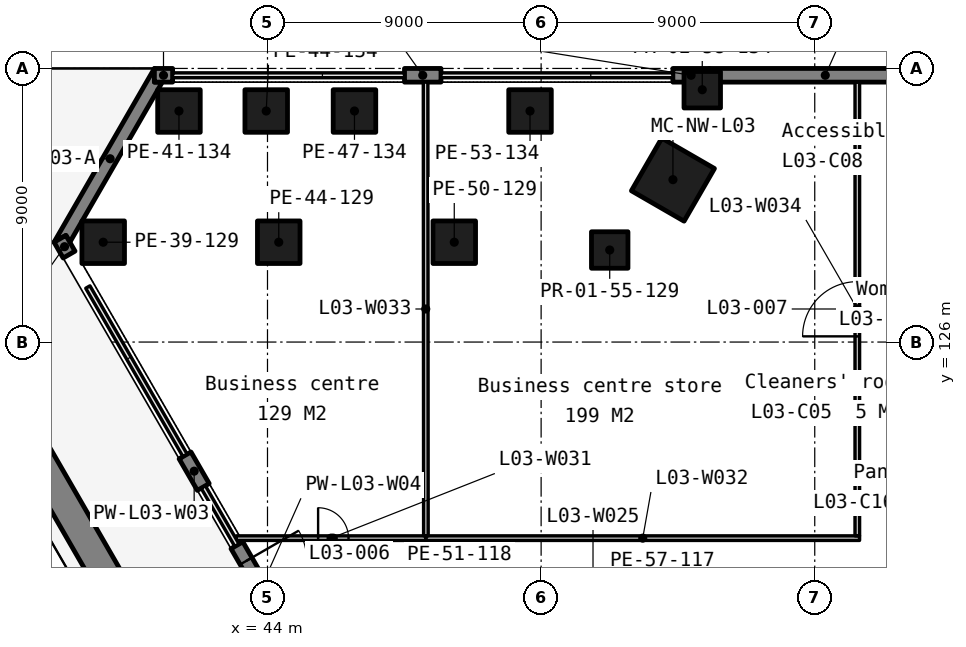
"""IFC4 building model, lengths in metres.
Left out: names, types, materials, properties, quantities, classifications, styles, units other than length and angle.
Written with IfcOpenShell. Run it as: python <this file> out.ifc"""

import sys

from ifc_helpers import new_model, si_unit, direction, frame, frame_2d, origin, origin_2d, place, context, subcontext, project, spatial, polyline, rectangle, outline, extrude, element, fill, save


model = new_model("IFC4")
c1 = context("Model", 3, precision=1e-05, world=origin(), true_north=direction((0.0, 1.0)))
c2 = subcontext(c1, "Body", "Model", "MODEL_VIEW")
j1 = project(units=[si_unit("LENGTHUNIT", "METRE"), si_unit("PLANEANGLEUNIT", "RADIAN")], contexts=[c1])
p1 = place(None, origin())
s1 = spatial("IfcSite", under=j1, at=p1, CompositionType="ELEMENT")
p2 = place(p1, origin())
s2 = spatial("IfcBuilding", under=s1, at=p2, CompositionType="ELEMENT")
p3 = place(p2, frame((0.0, 0.0, 19.5)))
s3 = spatial("IfcBuildingStorey", under=s2, at=p3, CompositionType="ELEMENT", Elevation=19.5)
for number, where, z_axis, x_axis in (
    (1, (38.596, 129.284, 0.0), (0.0, 0.0, 1.0), (1.0, 0.0, 0.0)),
    (2, (41.088, 133.6, 0.0), (0.0, 0.0, 1.0), (1.0, 0.0, 0.0)),
    (3, (44.37, 129.284, 0.0), (0.0, 0.0, 1.0), (1.0, 0.0, 0.0)),
    (4, (43.958, 133.6, 0.0), (0.0, 0.0, 1.0), (1.0, 0.0, 0.0)),
    (5, (46.861, 133.6, 0.0), (0.0, 0.0, 1.0), (1.0, 0.0, 0.0)),
    (6, (50.143, 129.284, 0.0), (0.0, 0.0, 1.0), (1.0, 0.0, 0.0)),
    (7, (52.635, 133.6, 0.0), (0.0, 0.0, 1.0), (1.0, 0.0, 0.0)),
):
    element("IfcColumn", number, at=place(p3, frame(where, z_axis=z_axis, x_axis=x_axis)), inside=s3, PredefinedType="COLUMN", context=c2, shape_type="SweptSolid", body=[
        extrude(rectangle(XDim=1.4, YDim=1.4, at=origin_2d()), origin(), (0.0, 0.0, 1.0), 5.5),
    ])
for number, where, z_axis, x_axis in (
    (8, (55.256, 129.028, 0.0), (0.0, 0.0, 1.0), (1.0, 0.0, 0.0)),
    (9, (58.3, 134.3, 0.0), (0.0, 0.0, 1.0), (1.0, 0.0, 0.0)),
):
    element("IfcColumn", number, at=place(p3, frame(where, z_axis=z_axis, x_axis=x_axis)), inside=s3, PredefinedType="COLUMN", context=c2, shape_type="SweptSolid", body=[
        extrude(rectangle(XDim=1.2, YDim=1.2, at=origin_2d()), origin(), (0.0, 0.0, 1.0), 5.5),
    ])
p4 = place(p3, frame((57.336, 131.342, 0.0), z_axis=(0.0, 0.0, 1.0), x_axis=(-0.5, -0.866025403784, 0.0)))
e10 = element("IfcColumn", 10, at=p4, inside=s3, PredefinedType="COLUMN", context=c2, shape_type="SweptSolid", body=[
    extrude(rectangle(XDim=2.0, YDim=2.0, at=origin_2d()), origin(), (0.0, 0.0, 1.0), 5.5),
])
p5 = place(p3, frame((0.0, 0.0, -0.25)))
e11 = element("IfcWall", 11, at=p5, inside=s3, PredefinedType="SOLIDWALL", context=c2, shape_type="SweptSolid", body=[
    extrude(outline(polyline([(40.28, 135.0), (40.28, 134.55), (40.539, 134.55), (37.499, 129.284), (37.369, 129.509), (36.979, 129.284), (40.28, 135.0)])), origin(), (0.0, 0.0, 1.0), 4.812),
])
p6 = place(p3, frame((66.16, 134.775, -0.25), z_axis=(0.0, 0.0, 1.0), x_axis=(-1.0, 0.0, 0.0)))
e12 = element("IfcWall", 12, at=p6, inside=s3, PredefinedType="SOLIDWALL", context=c2, shape_type="SweptSolid", body=[
    extrude(rectangle(XDim=7.627, YDim=0.45, at=frame_2d((3.813, 0.0))), origin(), (0.0, 0.0, 1.0), 4.812),
])
for number, where, z_axis, x_axis in (
    (13, (58.533, 134.775, -0.25), (0.0, 0.0, 1.0), (-1.0, 0.0, 0.0)),
    (14, (49.706, 134.775, -0.25), (0.0, 0.0, 1.0), (-1.0, 0.0, 0.0)),
):
    element("IfcWall", number, at=place(p3, frame(where, z_axis=z_axis, x_axis=x_axis)), inside=s3, PredefinedType="SOLIDWALL", context=c2, shape_type="SweptSolid", body=[
        extrude(rectangle(XDim=1.2, YDim=0.45, at=frame_2d((0.6, 0.0))), origin(), (0.0, 0.0, 1.0), 4.812),
    ])
for number, where, z_axis, x_axis in (
    (15, (40.879, 134.775, -0.25), (0.0, 0.0, 1.0), (-1.0, 0.0, 0.0)),
    (16, (37.174, 129.397, -0.25), (0.0, 0.0, 1.0), (0.5, -0.866, 0.0)),
):
    element("IfcWall", number, at=place(p3, frame(where, z_axis=z_axis, x_axis=x_axis)), inside=s3, PredefinedType="SOLIDWALL", context=c2, shape_type="SweptSolid", body=[
        extrude(rectangle(XDim=0.6, YDim=0.45, at=frame_2d((0.3, 0.0))), origin(), (0.0, 0.0, 1.0), 4.812),
    ])
p7 = place(p3, frame((41.288, 122.272, -0.25), z_axis=(0.0, 0.0, 1.0), x_axis=(0.499880961361, -0.866094119867, 0.0)))
e17 = element("IfcWall", 17, at=p7, inside=s3, PredefinedType="SOLIDWALL", context=c2, shape_type="SweptSolid", body=[
    extrude(rectangle(XDim=1.2, YDim=0.45, at=frame_2d((0.6, 0.0))), origin(), (0.0, 0.0, 1.0), 4.812),
])
p8 = place(p3, frame((42.994, 119.316, -0.25), z_axis=(0.0, 0.0, 1.0), x_axis=(0.499995408039, -0.866028054938, 0.0)))
e18 = element("IfcWall", 18, at=p8, inside=s3, PredefinedType="SOLIDWALL", context=c2, shape_type="SweptSolid", body=[
    extrude(rectangle(XDim=3.2, YDim=0.45, at=frame_2d((1.6, 0.0))), origin(), (0.0, 0.0, 1.0), 4.812),
])
p9 = place(p8, frame((0.6, 0.0, 0.25)))
e19 = element("IfcOpeningElement", 19, at=p9, cuts=e18, PredefinedType="OPENING", context=c2, shape_type="SweptSolid", body=[
    extrude(rectangle(XDim=2.0, YDim=2.4, at=frame_2d((1.0, 1.2))), frame((0.0, 0.235, 0.0), z_axis=(0.0, -1.0, 0.0), x_axis=(1.0, 0.0, 0.0)), (0.0, 0.0, 1.0), 0.47),
])
p10 = place(p3, frame((77.166, 51.679, 0.0), z_axis=(0.0, 0.0, 1.0), x_axis=(-0.500001590908, 0.866024485271, 0.0)))
e20 = element("IfcWall", 20, at=p10, inside=s3, PredefinedType="STANDARD", context=c2, shape_type="SweptSolid", body=[
    extrude(rectangle(XDim=89.388, YDim=1.0, at=frame_2d((44.694, 0.0))), origin(), (0.0, 0.0, 1.0), 0.6),
])
p11 = place(p3, frame((42.972, 119.55, 0.0), z_axis=(0.0, 0.0, 1.0), x_axis=(1.0, 0.0, 0.0)))
e21 = element("IfcWall", 21, at=p11, inside=s3, PredefinedType="PARTITIONING", context=c2, shape_type="SweptSolid", body=[
    extrude(rectangle(XDim=6.238, YDim=0.15, at=frame_2d((3.119, 0.0))), origin(), (0.0, 0.0, 1.0), 5.25),
])
p12 = place(p11, frame((2.693, 0.0, 0.0)))
e22 = element("IfcOpeningElement", 22, at=p12, cuts=e21, PredefinedType="OPENING", context=c2, shape_type="SweptSolid", body=[
    extrude(rectangle(XDim=1.0, YDim=2.1, at=frame_2d((0.5, 1.05))), frame((0.0, 0.085, 0.0), z_axis=(0.0, -1.0, 0.0), x_axis=(1.0, 0.0, 0.0)), (0.0, 0.0, 1.0), 0.17),
])
p13 = place(p3, frame((49.21, 119.55, 0.0), z_axis=(0.0, 0.0, 1.0), x_axis=(1.0, 0.0, 0.0)))
e23 = element("IfcWall", 23, at=p13, inside=s3, PredefinedType="PARTITIONING", context=c2, shape_type="SweptSolid", body=[
    extrude(rectangle(XDim=14.265, YDim=0.15, at=frame_2d((7.132, 0.0))), origin(), (0.0, 0.0, 1.0), 5.25),
])
p14 = place(p3, frame((49.21, 119.625, 0.0), z_axis=(0.0, 0.0, 1.0), x_axis=(-0.000670668719, 0.999999775102, 0.0)))
e24 = element("IfcWall", 24, at=p14, inside=s3, PredefinedType="PARTITIONING", context=c2, shape_type="SweptSolid", body=[
    extrude(rectangle(XDim=14.925, YDim=0.15, at=frame_2d((7.462, 0.0))), origin(), (0.0, 0.0, 1.0), 5.25),
])
p15 = place(p3, frame((63.399, 119.625, 0.0), z_axis=(0.0, 0.0, 1.0), x_axis=(3.2715555e-05, 0.999999999465, 0.0)))
e25 = element("IfcWall", 25, at=p15, inside=s3, PredefinedType="PARTITIONING", context=c2, shape_type="SweptSolid", body=[
    extrude(rectangle(XDim=14.925, YDim=0.15, at=frame_2d((7.462, 0.0))), origin(), (0.0, 0.0, 1.0), 5.25),
])
p16 = place(p15, frame((6.562, 0.0, 0.0)))
e26 = element("IfcOpeningElement", 26, at=p16, cuts=e25, PredefinedType="OPENING", context=c2, shape_type="SweptSolid", body=[
    extrude(rectangle(XDim=1.8, YDim=2.1, at=frame_2d((0.9, 1.05))), frame((0.0, 0.085, 0.0), z_axis=(0.0, -1.0, 0.0), x_axis=(1.0, 0.0, 0.0)), (0.0, 0.0, 1.0), 0.17),
])
p17 = place(p9, origin())
e27 = element("IfcDoor", 27, at=p17, inside=s3, OperationType="DOUBLE_DOOR_SINGLE_SWING", PredefinedType="DOOR", context=c2, shape_type="SweptSolid", body=[
    extrude(rectangle(XDim=2.0, YDim=2.4, at=frame_2d((1.0, 1.2))), frame((0.0, 0.025, 0.0), z_axis=(0.0, -1.0, 0.0), x_axis=(1.0, 0.0, 0.0)), (0.0, 0.0, 1.0), 0.05),
])
fill(e19, e27)
p18 = place(p12, origin())
e28 = element("IfcDoor", 28, at=p18, inside=s3, OperationType="SINGLE_SWING_LEFT", PredefinedType="DOOR", context=c2, shape_type="SweptSolid", body=[
    extrude(rectangle(XDim=1.0, YDim=2.1, at=frame_2d((0.5, 1.05))), frame((0.0, 0.025, 0.0), z_axis=(0.0, -1.0, 0.0), x_axis=(1.0, 0.0, 0.0)), (0.0, 0.0, 1.0), 0.05),
])
fill(e22, e28)
p19 = place(p16, origin())
e29 = element("IfcDoor", 29, at=p19, inside=s3, OperationType="SINGLE_SWING_LEFT", PredefinedType="DOOR", context=c2, shape_type="SweptSolid", body=[
    extrude(rectangle(XDim=1.8, YDim=2.1, at=frame_2d((0.9, 1.05))), frame((0.0, 0.025, 0.0), z_axis=(0.0, -1.0, 0.0), x_axis=(1.0, 0.0, 0.0)), (0.0, 0.0, 1.0), 0.05),
])
fill(e26, e29)
save(model, sys.argv[1])
